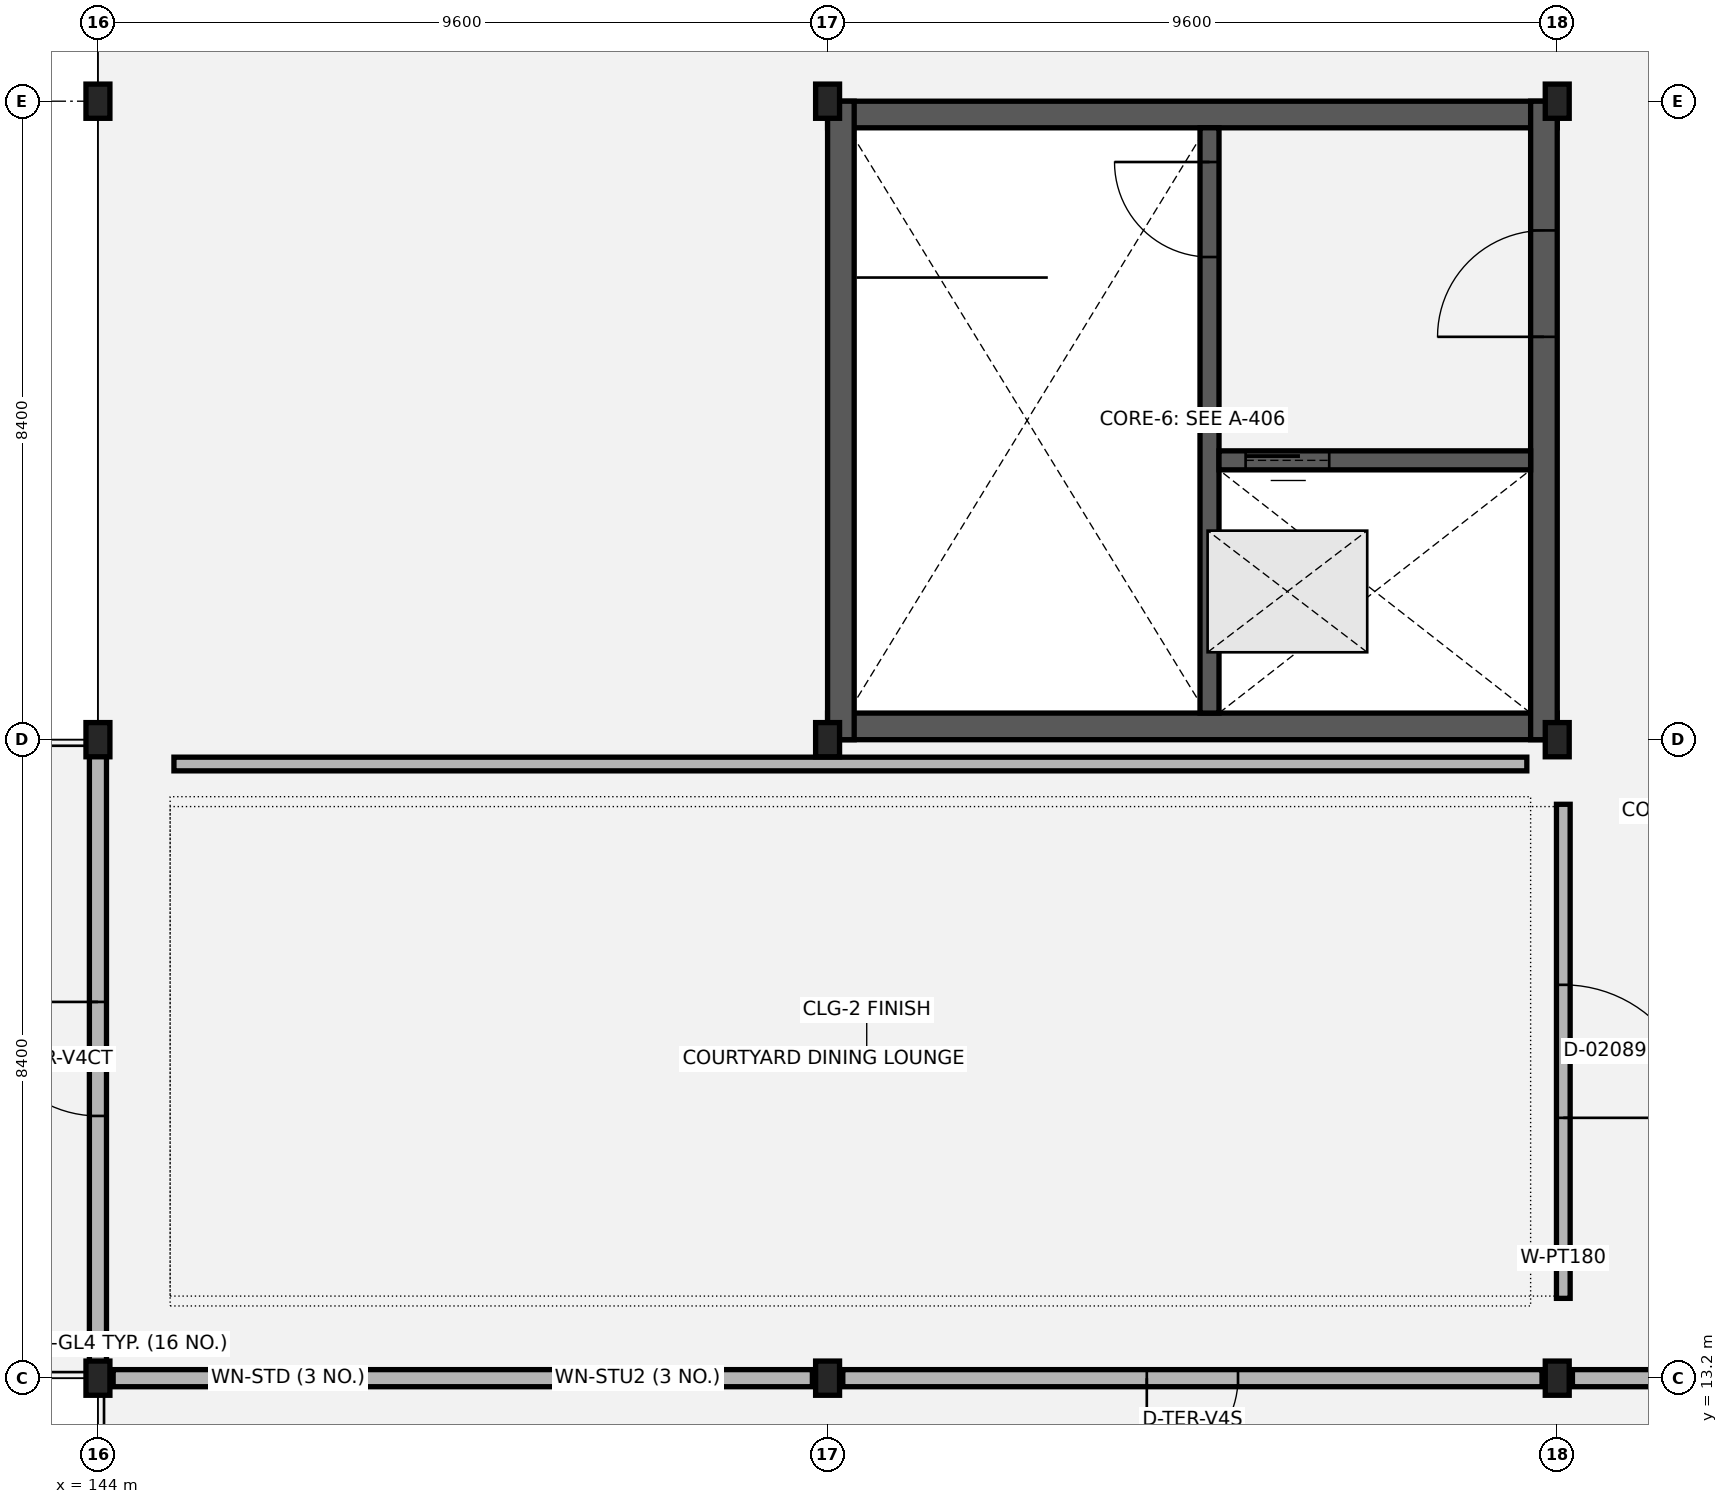
"""IFC4 building model, lengths in metres.
Left out: names, types, materials, properties, quantities, classifications, styles, units other than length and angle.
Written with IfcOpenShell. Run it as: python <this file> out.ifc"""

import sys

from ifc_helpers import new_model, si_unit, direction, frame, frame_2d, origin, origin_2d, place, context, subcontext, project, spatial, rectangle, extrude, element, fill, save


model = new_model("IFC4")
c1 = context("Model", 3, precision=1e-05, world=origin(), true_north=direction((0.0, 1.0)))
c2 = subcontext(c1, "Body", "Model", "MODEL_VIEW")
j1 = project(units=[si_unit("LENGTHUNIT", "METRE"), si_unit("PLANEANGLEUNIT", "RADIAN")], contexts=[c1])
p1 = place(None, origin())
s1 = spatial("IfcSite", under=j1, at=p1, CompositionType="ELEMENT")
p2 = place(p1, origin())
s2 = spatial("IfcBuilding", under=s1, at=p2, CompositionType="ELEMENT")
p3 = place(p2, frame((0.0, 0.0, 10.2)))
s3 = spatial("IfcBuildingStorey", under=s2, at=p3, CompositionType="ELEMENT", Elevation=10.2)
for number, where, z_axis, x_axis in (
    (1, (144.0, 13.2, 0.0), (0.0, 0.0, 1.0), (1.0, 0.0, 0.0)),
    (2, (144.0, 21.6, 0.0), (0.0, 0.0, 1.0), (1.0, 0.0, 0.0)),
    (3, (144.0, 30.0, 0.0), (0.0, 0.0, 1.0), (1.0, 0.0, 0.0)),
):
    element("IfcColumn", number, at=place(p3, frame(where, z_axis=z_axis, x_axis=x_axis)), inside=s3, PredefinedType="COLUMN", context=c2, shape_type="SweptSolid", body=[
        extrude(rectangle(XDim=0.315, YDim=0.45, at=origin_2d()), origin(), (0.0, 0.0, 1.0), 5.076),
    ])
for number, where, z_axis, x_axis in (
    (4, (153.6, 13.2, 0.0), (0.0, 0.0, 1.0), (1.0, 0.0, 0.0)),
    (5, (153.6, 21.6, 0.0), (0.0, 0.0, 1.0), (1.0, 0.0, 0.0)),
    (6, (153.6, 30.0, 0.0), (0.0, 0.0, 1.0), (1.0, 0.0, 0.0)),
):
    element("IfcColumn", number, at=place(p3, frame(where, z_axis=z_axis, x_axis=x_axis)), inside=s3, PredefinedType="COLUMN", context=c2, shape_type="SweptSolid", body=[
        extrude(rectangle(XDim=0.315, YDim=0.45, at=origin_2d()), origin(), (0.0, 0.0, 1.0), 3.98),
    ])
for number, where, z_axis, x_axis in (
    (7, (163.2, 13.2, 0.0), (0.0, 0.0, 1.0), (1.0, 0.0, 0.0)),
    (8, (163.2, 21.6, 0.0), (0.0, 0.0, 1.0), (1.0, 0.0, 0.0)),
    (9, (163.2, 30.0, 0.0), (0.0, 0.0, 1.0), (1.0, 0.0, 0.0)),
):
    element("IfcColumn", number, at=place(p3, frame(where, z_axis=z_axis, x_axis=x_axis)), inside=s3, PredefinedType="COLUMN", context=c2, shape_type="SweptSolid", body=[
        extrude(rectangle(XDim=0.315, YDim=0.45, at=origin_2d()), origin(), (0.0, 0.0, 1.0), 5.072),
    ])
p4 = place(p3, frame((144.0, 21.4, 0.0), z_axis=(0.0, 0.0, 1.0), x_axis=(0.0, -1.0, 0.0)))
e10 = element("IfcWall", 10, at=p4, inside=s3, PredefinedType="SOLIDWALL", context=c2, shape_type="SweptSolid", body=[
    extrude(rectangle(XDim=8.0, YDim=0.225, at=frame_2d((4.0, 0.0))), origin(), (0.0, 0.0, 1.0), 3.8),
])
p5 = place(p4, frame((3.25, 0.0, 0.0)))
e11 = element("IfcOpeningElement", 11, at=p5, cuts=e10, PredefinedType="OPENING", context=c2, shape_type="SweptSolid", body=[
    extrude(rectangle(XDim=1.5, YDim=2.15, at=frame_2d((0.75, 1.075))), frame((0.0, 0.123, 0.0), z_axis=(0.0, -1.0, 0.0), x_axis=(1.0, 0.0, 0.0)), (0.0, 0.0, 1.0), 0.245),
])
p6 = place(p3, frame((144.2, 13.2, 0.0), z_axis=(0.0, 0.0, 1.0), x_axis=(1.0, 0.0, 0.0)))
e12 = element("IfcWall", 12, at=p6, inside=s3, PredefinedType="SOLIDWALL", context=c2, shape_type="SweptSolid", body=[
    extrude(rectangle(XDim=9.2, YDim=0.225, at=frame_2d((4.6, 0.0))), origin(), (0.0, 0.0, 1.0), 3.8),
])
p7 = place(p6, frame((1.4, 0.0, 0.9)))
e13 = element("IfcOpeningElement", 13, at=p7, cuts=e12, PredefinedType="OPENING", context=c2, shape_type="SweptSolid", body=[
    extrude(rectangle(XDim=1.8, YDim=1.6, at=frame_2d((0.9, 0.8))), frame((0.0, 0.123, 0.0), z_axis=(0.0, -1.0, 0.0), x_axis=(1.0, 0.0, 0.0)), (0.0, 0.0, 1.0), 0.245),
])
p8 = place(p6, frame((5.85, 0.0, 0.9)))
e14 = element("IfcOpeningElement", 14, at=p8, cuts=e12, PredefinedType="OPENING", context=c2, shape_type="SweptSolid", body=[
    extrude(rectangle(XDim=2.1, YDim=1.6, at=frame_2d((1.05, 0.8))), frame((0.0, 0.123, 0.0), z_axis=(0.0, -1.0, 0.0), x_axis=(1.0, 0.0, 0.0)), (0.0, 0.0, 1.0), 0.245),
])
p9 = place(p3, frame((153.8, 13.2, 0.0), z_axis=(0.0, 0.0, 1.0), x_axis=(1.0, 0.0, 0.0)))
e15 = element("IfcWall", 15, at=p9, inside=s3, PredefinedType="SOLIDWALL", context=c2, shape_type="SweptSolid", body=[
    extrude(rectangle(XDim=9.2, YDim=0.225, at=frame_2d((4.6, 0.0))), origin(), (0.0, 0.0, 1.0), 3.8),
])
p10 = place(p9, frame((4.0, 0.0, 0.0)))
e16 = element("IfcOpeningElement", 16, at=p10, cuts=e15, PredefinedType="OPENING", context=c2, shape_type="SweptSolid", body=[
    extrude(rectangle(XDim=1.2, YDim=2.15, at=frame_2d((0.6, 1.075))), frame((0.0, 0.123, 0.0), z_axis=(0.0, -1.0, 0.0), x_axis=(1.0, 0.0, 0.0)), (0.0, 0.0, 1.0), 0.245),
])
p11 = place(p3, frame((163.4, 13.2, 0.0), z_axis=(0.0, 0.0, 1.0), x_axis=(1.0, 0.0, 0.0)))
e17 = element("IfcWall", 17, at=p11, inside=s3, PredefinedType="SOLIDWALL", context=c2, shape_type="SweptSolid", body=[
    extrude(rectangle(XDim=9.2, YDim=0.225, at=frame_2d((4.6, 0.0))), origin(), (0.0, 0.0, 1.0), 3.8),
])
p12 = place(p11, frame((1.4, 0.0, 0.9)))
e18 = element("IfcOpeningElement", 18, at=p12, cuts=e17, PredefinedType="OPENING", context=c2, shape_type="SweptSolid", body=[
    extrude(rectangle(XDim=1.8, YDim=1.6, at=frame_2d((0.9, 0.8))), frame((0.0, 0.123, 0.0), z_axis=(0.0, -1.0, 0.0), x_axis=(1.0, 0.0, 0.0)), (0.0, 0.0, 1.0), 0.245),
])
p13 = place(p11, frame((5.85, 0.0, 0.9)))
e19 = element("IfcOpeningElement", 19, at=p13, cuts=e17, PredefinedType="OPENING", context=c2, shape_type="SweptSolid", body=[
    extrude(rectangle(XDim=2.1, YDim=1.6, at=frame_2d((1.05, 0.8))), frame((0.0, 0.123, 0.0), z_axis=(0.0, -1.0, 0.0), x_axis=(1.0, 0.0, 0.0)), (0.0, 0.0, 1.0), 0.245),
])
for number, where, z_axis, x_axis in (
    (20, (153.6, 29.825, 0.0), (0.0, 0.0, 1.0), (1.0, 0.0, 0.0)),
    (21, (153.6, 21.775, 0.0), (0.0, 0.0, 1.0), (1.0, 0.0, 0.0)),
):
    element("IfcWall", number, at=place(p3, frame(where, z_axis=z_axis, x_axis=x_axis)), inside=s3, PredefinedType="SHEAR", context=c2, shape_type="SweptSolid", body=[
        extrude(rectangle(XDim=9.6, YDim=0.35, at=frame_2d((4.8, 0.0))), origin(), (0.0, 0.0, 1.0), 3.95),
    ])
p14 = place(p3, frame((153.775, 21.6, 0.0), z_axis=(0.0, 0.0, 1.0), x_axis=(0.0, 1.0, 0.0)))
e22 = element("IfcWall", 22, at=p14, inside=s3, PredefinedType="SHEAR", context=c2, shape_type="SweptSolid", body=[
    extrude(rectangle(XDim=8.4, YDim=0.35, at=frame_2d((4.2, 0.0))), origin(), (0.0, 0.0, 1.0), 3.95),
])
p15 = place(p3, frame((163.025, 21.6, 0.0), z_axis=(0.0, 0.0, 1.0), x_axis=(0.0, 1.0, 0.0)))
e23 = element("IfcWall", 23, at=p15, inside=s3, PredefinedType="SHEAR", context=c2, shape_type="SweptSolid", body=[
    extrude(rectangle(XDim=8.4, YDim=0.35, at=frame_2d((4.2, 0.0))), origin(), (0.0, 0.0, 1.0), 3.95),
])
p16 = place(p15, frame((5.3, 0.0, 0.0)))
e24 = element("IfcOpeningElement", 24, at=p16, cuts=e23, PredefinedType="OPENING", context=c2, shape_type="SweptSolid", body=[
    extrude(rectangle(XDim=1.4, YDim=2.15, at=frame_2d((0.7, 1.075))), frame((0.0, 0.185, 0.0), z_axis=(0.0, -1.0, 0.0), x_axis=(1.0, 0.0, 0.0)), (0.0, 0.0, 1.0), 0.37),
])
p17 = place(p3, frame((158.625, 29.65, 0.0), z_axis=(0.0, 0.0, 1.0), x_axis=(0.0, -1.0, 0.0)))
e25 = element("IfcWall", 25, at=p17, inside=s3, PredefinedType="SHEAR", context=c2, shape_type="SweptSolid", body=[
    extrude(rectangle(XDim=7.7, YDim=0.25, at=frame_2d((3.85, 0.0))), origin(), (0.0, 0.0, 1.0), 3.95),
])
p18 = place(p17, frame((0.45, 0.0, 0.0)))
e26 = element("IfcOpeningElement", 26, at=p18, cuts=e25, PredefinedType="OPENING", context=c2, shape_type="SweptSolid", body=[
    extrude(rectangle(XDim=1.25, YDim=2.15, at=frame_2d((0.625, 1.075))), frame((0.0, 0.135, 0.0), z_axis=(0.0, -1.0, 0.0), x_axis=(1.0, 0.0, 0.0)), (0.0, 0.0, 1.0), 0.27),
])
p19 = place(p3, frame((158.75, 25.275, 0.0), z_axis=(0.0, 0.0, 1.0), x_axis=(1.0, 0.0, 0.0)))
e27 = element("IfcWall", 27, at=p19, inside=s3, PredefinedType="SHEAR", context=c2, shape_type="SweptSolid", body=[
    extrude(rectangle(XDim=4.1, YDim=0.25, at=frame_2d((2.05, 0.0))), origin(), (0.0, 0.0, 1.0), 3.95),
])
p20 = place(p19, frame((0.35, 0.0, 0.0)))
e28 = element("IfcOpeningElement", 28, at=p20, cuts=e27, PredefinedType="OPENING", context=c2, shape_type="SweptSolid", body=[
    extrude(rectangle(XDim=1.1, YDim=2.15, at=frame_2d((0.55, 1.075))), frame((0.0, 0.135, 0.0), z_axis=(0.0, -1.0, 0.0), x_axis=(1.0, 0.0, 0.0)), (0.0, 0.0, 1.0), 0.27),
])
p21 = place(p3, frame((163.28, 14.25, 0.0), z_axis=(0.0, 0.0, 1.0), x_axis=(0.0, 1.0, 0.0)))
e29 = element("IfcWall", 29, at=p21, inside=s3, PredefinedType="PARTITIONING", context=c2, shape_type="SweptSolid", body=[
    extrude(rectangle(XDim=6.5, YDim=0.18, at=frame_2d((3.25, 0.0))), origin(), (0.0, 0.0, 1.0), 3.03),
])
p22 = place(p21, frame((2.375, 0.0, 0.0)))
e30 = element("IfcOpeningElement", 30, at=p22, cuts=e29, PredefinedType="OPENING", context=c2, shape_type="SweptSolid", body=[
    extrude(rectangle(XDim=1.75, YDim=2.15, at=frame_2d((0.875, 1.075))), frame((0.0, 0.1, 0.0), z_axis=(0.0, -1.0, 0.0), x_axis=(1.0, 0.0, 0.0)), (0.0, 0.0, 1.0), 0.2),
])
p23 = place(p3, frame((145.0, 21.28, 0.0), z_axis=(0.0, 0.0, 1.0), x_axis=(1.0, 0.0, 0.0)))
e31 = element("IfcWall", 31, at=p23, inside=s3, PredefinedType="PARTITIONING", context=c2, shape_type="SweptSolid", body=[
    extrude(rectangle(XDim=17.8, YDim=0.18, at=frame_2d((8.9, 0.0))), origin(), (0.0, 0.0, 1.0), 3.03),
])
p24 = place(p5, origin())
e32 = element("IfcDoor", 32, at=p24, inside=s3, OperationType="SINGLE_SWING_RIGHT", PredefinedType="DOOR", context=c2, shape_type="SweptSolid", body=[
    extrude(rectangle(XDim=1.5, YDim=2.15, at=frame_2d((0.75, 1.075))), frame((0.0, 0.025, 0.0), z_axis=(0.0, -1.0, 0.0), x_axis=(1.0, 0.0, 0.0)), (0.0, 0.0, 1.0), 0.05),
])
fill(e11, e32)
p25 = place(p7, origin())
e33 = element("IfcWindow", 33, at=p25, inside=s3, PartitioningType="SINGLE_PANEL", PredefinedType="WINDOW", context=c2, shape_type="SweptSolid", body=[
    extrude(rectangle(XDim=1.8, YDim=1.6, at=frame_2d((0.9, 0.8))), frame((0.0, 0.03, 0.0), z_axis=(0.0, -1.0, 0.0), x_axis=(1.0, 0.0, 0.0)), (0.0, 0.0, 1.0), 0.06),
])
fill(e13, e33)
p26 = place(p8, origin())
e34 = element("IfcWindow", 34, at=p26, inside=s3, PartitioningType="SINGLE_PANEL", PredefinedType="WINDOW", context=c2, shape_type="SweptSolid", body=[
    extrude(rectangle(XDim=2.1, YDim=1.6, at=frame_2d((1.05, 0.8))), frame((0.0, 0.03, 0.0), z_axis=(0.0, -1.0, 0.0), x_axis=(1.0, 0.0, 0.0)), (0.0, 0.0, 1.0), 0.06),
])
fill(e14, e34)
p27 = place(p10, origin())
e35 = element("IfcDoor", 35, at=p27, inside=s3, OperationType="SINGLE_SWING_RIGHT", PredefinedType="DOOR", context=c2, shape_type="SweptSolid", body=[
    extrude(rectangle(XDim=1.2, YDim=2.15, at=frame_2d((0.6, 1.075))), frame((0.0, 0.025, 0.0), z_axis=(0.0, -1.0, 0.0), x_axis=(1.0, 0.0, 0.0)), (0.0, 0.0, 1.0), 0.05),
])
fill(e16, e35)
p28 = place(p18, origin())
e36 = element("IfcDoor", 36, at=p28, inside=s3, OperationType="SINGLE_SWING_RIGHT", PredefinedType="DOOR", context=c2, shape_type="SweptSolid", body=[
    extrude(rectangle(XDim=1.25, YDim=2.15, at=frame_2d((0.625, 1.075))), frame((0.0, 0.025, 0.0), z_axis=(0.0, -1.0, 0.0), x_axis=(1.0, 0.0, 0.0)), (0.0, 0.0, 1.0), 0.05),
])
fill(e26, e36)
p29 = place(p20, origin())
e37 = element("IfcDoor", 37, at=p29, inside=s3, OperationType="SLIDING_TO_LEFT", PredefinedType="DOOR", context=c2, shape_type="SweptSolid", body=[
    extrude(rectangle(XDim=1.1, YDim=2.15, at=frame_2d((0.55, 1.075))), frame((0.0, 0.025, 0.0), z_axis=(0.0, -1.0, 0.0), x_axis=(1.0, 0.0, 0.0)), (0.0, 0.0, 1.0), 0.05),
])
fill(e28, e37)
p30 = place(p16, origin())
e38 = element("IfcDoor", 38, at=p30, inside=s3, OperationType="SINGLE_SWING_LEFT", PredefinedType="DOOR", context=c2, shape_type="SweptSolid", body=[
    extrude(rectangle(XDim=1.4, YDim=2.15, at=frame_2d((0.7, 1.075))), frame((0.0, 0.025, 0.0), z_axis=(0.0, -1.0, 0.0), x_axis=(1.0, 0.0, 0.0)), (0.0, 0.0, 1.0), 0.05),
])
fill(e24, e38)
p31 = place(p22, origin())
e39 = element("IfcDoor", 39, at=p31, inside=s3, OperationType="SINGLE_SWING_RIGHT", PredefinedType="DOOR", context=c2, shape_type="SweptSolid", body=[
    extrude(rectangle(XDim=1.75, YDim=2.15, at=frame_2d((0.875, 1.075))), frame((0.0, 0.025, 0.0), z_axis=(0.0, -1.0, 0.0), x_axis=(1.0, 0.0, 0.0)), (0.0, 0.0, 1.0), 0.05),
])
fill(e30, e39)
save(model, sys.argv[1])
